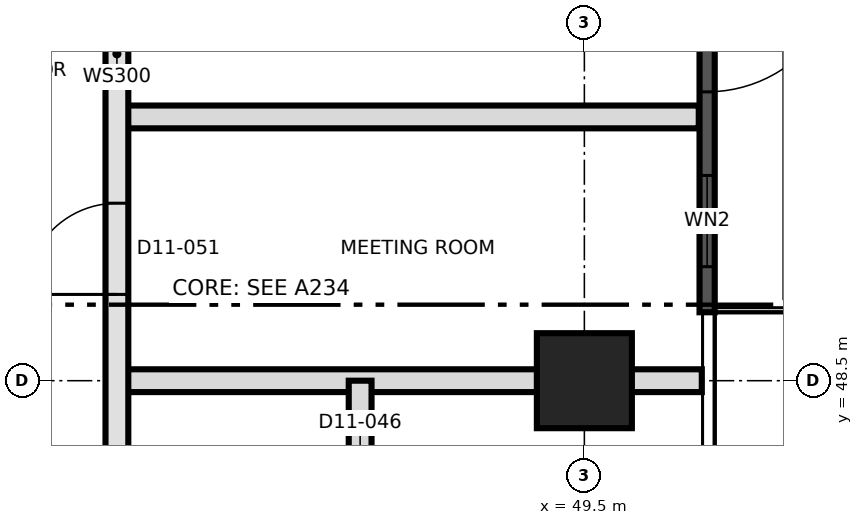
"""IFC4 building model, lengths in metres.
Left out: names, types, materials, properties, quantities, classifications, styles, units other than length and angle.
Written with IfcOpenShell. Run it as: python <this file> out.ifc"""

import sys

from ifc_helpers import new_model, si_unit, direction, frame, frame_2d, origin, origin_2d, place, context, subcontext, project, spatial, rectangle, extrude, element, fill, save


model = new_model("IFC4")
c1 = context("Model", 3, precision=1e-05, world=origin(), true_north=direction((0.0, 1.0)))
c2 = subcontext(c1, "Body", "Model", "MODEL_VIEW")
j1 = project(units=[si_unit("LENGTHUNIT", "METRE"), si_unit("PLANEANGLEUNIT", "RADIAN")], contexts=[c1])
p1 = place(None, origin())
s1 = spatial("IfcSite", under=j1, at=p1, CompositionType="ELEMENT")
p2 = place(p1, origin())
s2 = spatial("IfcBuilding", under=s1, at=p2, CompositionType="ELEMENT")
p3 = place(p2, frame((0.0, 0.0, 127.8)))
s3 = spatial("IfcBuildingStorey", under=s2, at=p3, CompositionType="ELEMENT", Elevation=127.8)
p4 = place(p3, frame((49.5, 48.5, 0.0), z_axis=(0.0, 0.0, 1.0), x_axis=(1.0, 0.0, 0.0)))
e1 = element("IfcColumn", 1, at=p4, inside=s3, PredefinedType="COLUMN", context=c2, shape_type="SweptSolid", body=[
    extrude(rectangle(XDim=1.25, YDim=1.25, at=origin_2d()), origin(), (0.0, 0.0, 1.0), 3.7),
])
p5 = place(p3, frame((51.115, 56.6, 0.0), z_axis=(0.0, 0.0, 1.0), x_axis=(0.0, -1.0, 0.0)))
e2 = element("IfcWall", 2, at=p5, inside=s3, PredefinedType="SOLIDWALL", context=c2, shape_type="SweptSolid", body=[
    extrude(rectangle(XDim=7.2, YDim=0.2, at=frame_2d((3.6, 0.0))), origin(), (0.0, 0.0, 1.0), 3.4),
])
p6 = place(p5, frame((2.5, 0.0, 0.0)))
e3 = element("IfcOpeningElement", 3, at=p6, cuts=e2, PredefinedType="OPENING", context=c2, shape_type="SweptSolid", body=[
    extrude(rectangle(XDim=1.8, YDim=2.4, at=frame_2d((0.9, 1.2))), frame((0.0, 0.11, 0.0), z_axis=(0.0, -1.0, 0.0), x_axis=(1.0, 0.0, 0.0)), (0.0, 0.0, 1.0), 0.22),
])
p7 = place(p5, frame((5.4, 0.0, 0.9)))
e4 = element("IfcOpeningElement", 4, at=p7, cuts=e2, PredefinedType="OPENING", context=c2, shape_type="SweptSolid", body=[
    extrude(rectangle(XDim=1.2, YDim=2.1, at=frame_2d((0.6, 1.05))), frame((0.0, 0.11, 0.0), z_axis=(0.0, -1.0, 0.0), x_axis=(1.0, 0.0, 0.0)), (0.0, 0.0, 1.0), 0.22),
])
p8 = place(p5, frame((0.6, 0.0, 0.9)))
e5 = element("IfcOpeningElement", 5, at=p8, cuts=e2, PredefinedType="OPENING", context=c2, shape_type="SweptSolid", body=[
    extrude(rectangle(XDim=1.2, YDim=2.1, at=frame_2d((0.6, 1.05))), frame((0.0, 0.11, 0.0), z_axis=(0.0, -1.0, 0.0), x_axis=(1.0, 0.0, 0.0)), (0.0, 0.0, 1.0), 0.22),
])
p9 = place(p3, frame((43.35, 48.5, 0.0), z_axis=(0.0, 0.0, 1.0), x_axis=(1.0, 0.0, 0.0)))
e6 = element("IfcWall", 6, at=p9, inside=s3, PredefinedType="PARTITIONING", context=c2, shape_type="SweptSolid", body=[
    extrude(rectangle(XDim=7.695, YDim=0.3, at=frame_2d((3.847, 0.0))), origin(), (0.0, 0.0, 1.0), 3.4),
])
p10 = place(p3, frame((43.35, 51.97, 0.0), z_axis=(0.0, 0.0, 1.0), x_axis=(1.0, 0.0, 0.0)))
e7 = element("IfcWall", 7, at=p10, inside=s3, PredefinedType="PARTITIONING", context=c2, shape_type="SweptSolid", body=[
    extrude(rectangle(XDim=7.655, YDim=0.3, at=frame_2d((3.827, 0.0))), origin(), (0.0, 0.0, 1.0), 3.4),
])
p11 = place(p3, frame((43.35, 39.8, 0.0), z_axis=(0.0, 0.0, 1.0), x_axis=(0.0, 1.0, 0.0)))
e8 = element("IfcWall", 8, at=p11, inside=s3, PredefinedType="SOLIDWALL", context=c2, shape_type="SweptSolid", body=[
    extrude(rectangle(XDim=26.0, YDim=0.3, at=frame_2d((13.0, 0.0))), origin(), (0.0, 0.0, 1.0), 3.4),
])
p12 = place(p11, frame((1.4, 0.0, 0.0)))
e9 = element("IfcOpeningElement", 9, at=p12, cuts=e8, PredefinedType="OPENING", context=c2, shape_type="SweptSolid", body=[
    extrude(rectangle(XDim=1.2, YDim=2.1, at=frame_2d((0.6, 1.05))), frame((0.0, 0.16, 0.0), z_axis=(0.0, -1.0, 0.0), x_axis=(1.0, 0.0, 0.0)), (0.0, 0.0, 1.0), 0.32),
])
p13 = place(p11, frame((4.65, 0.0, 0.0)))
e10 = element("IfcOpeningElement", 10, at=p13, cuts=e8, PredefinedType="OPENING", context=c2, shape_type="SweptSolid", body=[
    extrude(rectangle(XDim=1.0, YDim=2.1, at=frame_2d((0.5, 1.05))), frame((0.0, 0.16, 0.0), z_axis=(0.0, -1.0, 0.0), x_axis=(1.0, 0.0, 0.0)), (0.0, 0.0, 1.0), 0.32),
])
p14 = place(p11, frame((9.835, 0.0, 0.0)))
e11 = element("IfcOpeningElement", 11, at=p14, cuts=e8, PredefinedType="OPENING", context=c2, shape_type="SweptSolid", body=[
    extrude(rectangle(XDim=1.2, YDim=2.1, at=frame_2d((0.6, 1.05))), frame((0.0, 0.16, 0.0), z_axis=(0.0, -1.0, 0.0), x_axis=(1.0, 0.0, 0.0)), (0.0, 0.0, 1.0), 0.32),
])
p15 = place(p11, frame((13.085, 0.0, 0.0)))
e12 = element("IfcOpeningElement", 12, at=p15, cuts=e8, PredefinedType="OPENING", context=c2, shape_type="SweptSolid", body=[
    extrude(rectangle(XDim=1.0, YDim=2.1, at=frame_2d((0.5, 1.05))), frame((0.0, 0.16, 0.0), z_axis=(0.0, -1.0, 0.0), x_axis=(1.0, 0.0, 0.0)), (0.0, 0.0, 1.0), 0.32),
])
p16 = place(p11, frame((21.25, 0.0, 0.0)))
e13 = element("IfcOpeningElement", 13, at=p16, cuts=e8, PredefinedType="OPENING", context=c2, shape_type="SweptSolid", body=[
    extrude(rectangle(XDim=1.0, YDim=2.4, at=frame_2d((0.5, 1.2))), frame((0.0, 0.16, 0.0), z_axis=(0.0, -1.0, 0.0), x_axis=(1.0, 0.0, 0.0)), (0.0, 0.0, 1.0), 0.32),
])
p17 = place(p3, frame((46.55, 45.8, 0.0), z_axis=(0.0, 0.0, 1.0), x_axis=(0.0, 1.0, 0.0)))
e14 = element("IfcWall", 14, at=p17, inside=s3, PredefinedType="PARTITIONING", context=c2, shape_type="SweptSolid", body=[
    extrude(rectangle(XDim=2.7, YDim=0.3, at=frame_2d((1.35, 0.0))), origin(), (0.0, 0.0, 1.0), 3.4),
])
p18 = place(p17, frame((0.95, 0.0, 0.0)))
e15 = element("IfcOpeningElement", 15, at=p18, cuts=e14, PredefinedType="OPENING", context=c2, shape_type="SweptSolid", body=[
    extrude(rectangle(XDim=0.8, YDim=2.1, at=frame_2d((0.4, 1.05))), frame((0.0, 0.16, 0.0), z_axis=(0.0, -1.0, 0.0), x_axis=(1.0, 0.0, 0.0)), (0.0, 0.0, 1.0), 0.32),
])
p19 = place(p6, origin())
e16 = element("IfcDoor", 16, at=p19, inside=s3, OperationType="SINGLE_SWING_LEFT", PredefinedType="DOOR", context=c2, shape_type="SweptSolid", body=[
    extrude(rectangle(XDim=1.8, YDim=2.4, at=frame_2d((0.9, 1.2))), frame((0.0, 0.025, 0.0), z_axis=(0.0, -1.0, 0.0), x_axis=(1.0, 0.0, 0.0)), (0.0, 0.0, 1.0), 0.05),
])
fill(e3, e16)
p20 = place(p7, origin())
e17 = element("IfcWindow", 17, at=p20, inside=s3, PartitioningType="SINGLE_PANEL", PredefinedType="WINDOW", context=c2, shape_type="SweptSolid", body=[
    extrude(rectangle(XDim=1.2, YDim=2.1, at=frame_2d((0.6, 1.05))), frame((0.0, 0.03, 0.0), z_axis=(0.0, -1.0, 0.0), x_axis=(1.0, 0.0, 0.0)), (0.0, 0.0, 1.0), 0.06),
])
fill(e4, e17)
p21 = place(p14, origin())
e18 = element("IfcDoor", 18, at=p21, inside=s3, OperationType="SINGLE_SWING_LEFT", PredefinedType="DOOR", context=c2, shape_type="SweptSolid", body=[
    extrude(rectangle(XDim=1.2, YDim=2.1, at=frame_2d((0.6, 1.05))), frame((0.0, 0.025, 0.0), z_axis=(0.0, -1.0, 0.0), x_axis=(1.0, 0.0, 0.0)), (0.0, 0.0, 1.0), 0.05),
])
fill(e11, e18)
save(model, sys.argv[1])
